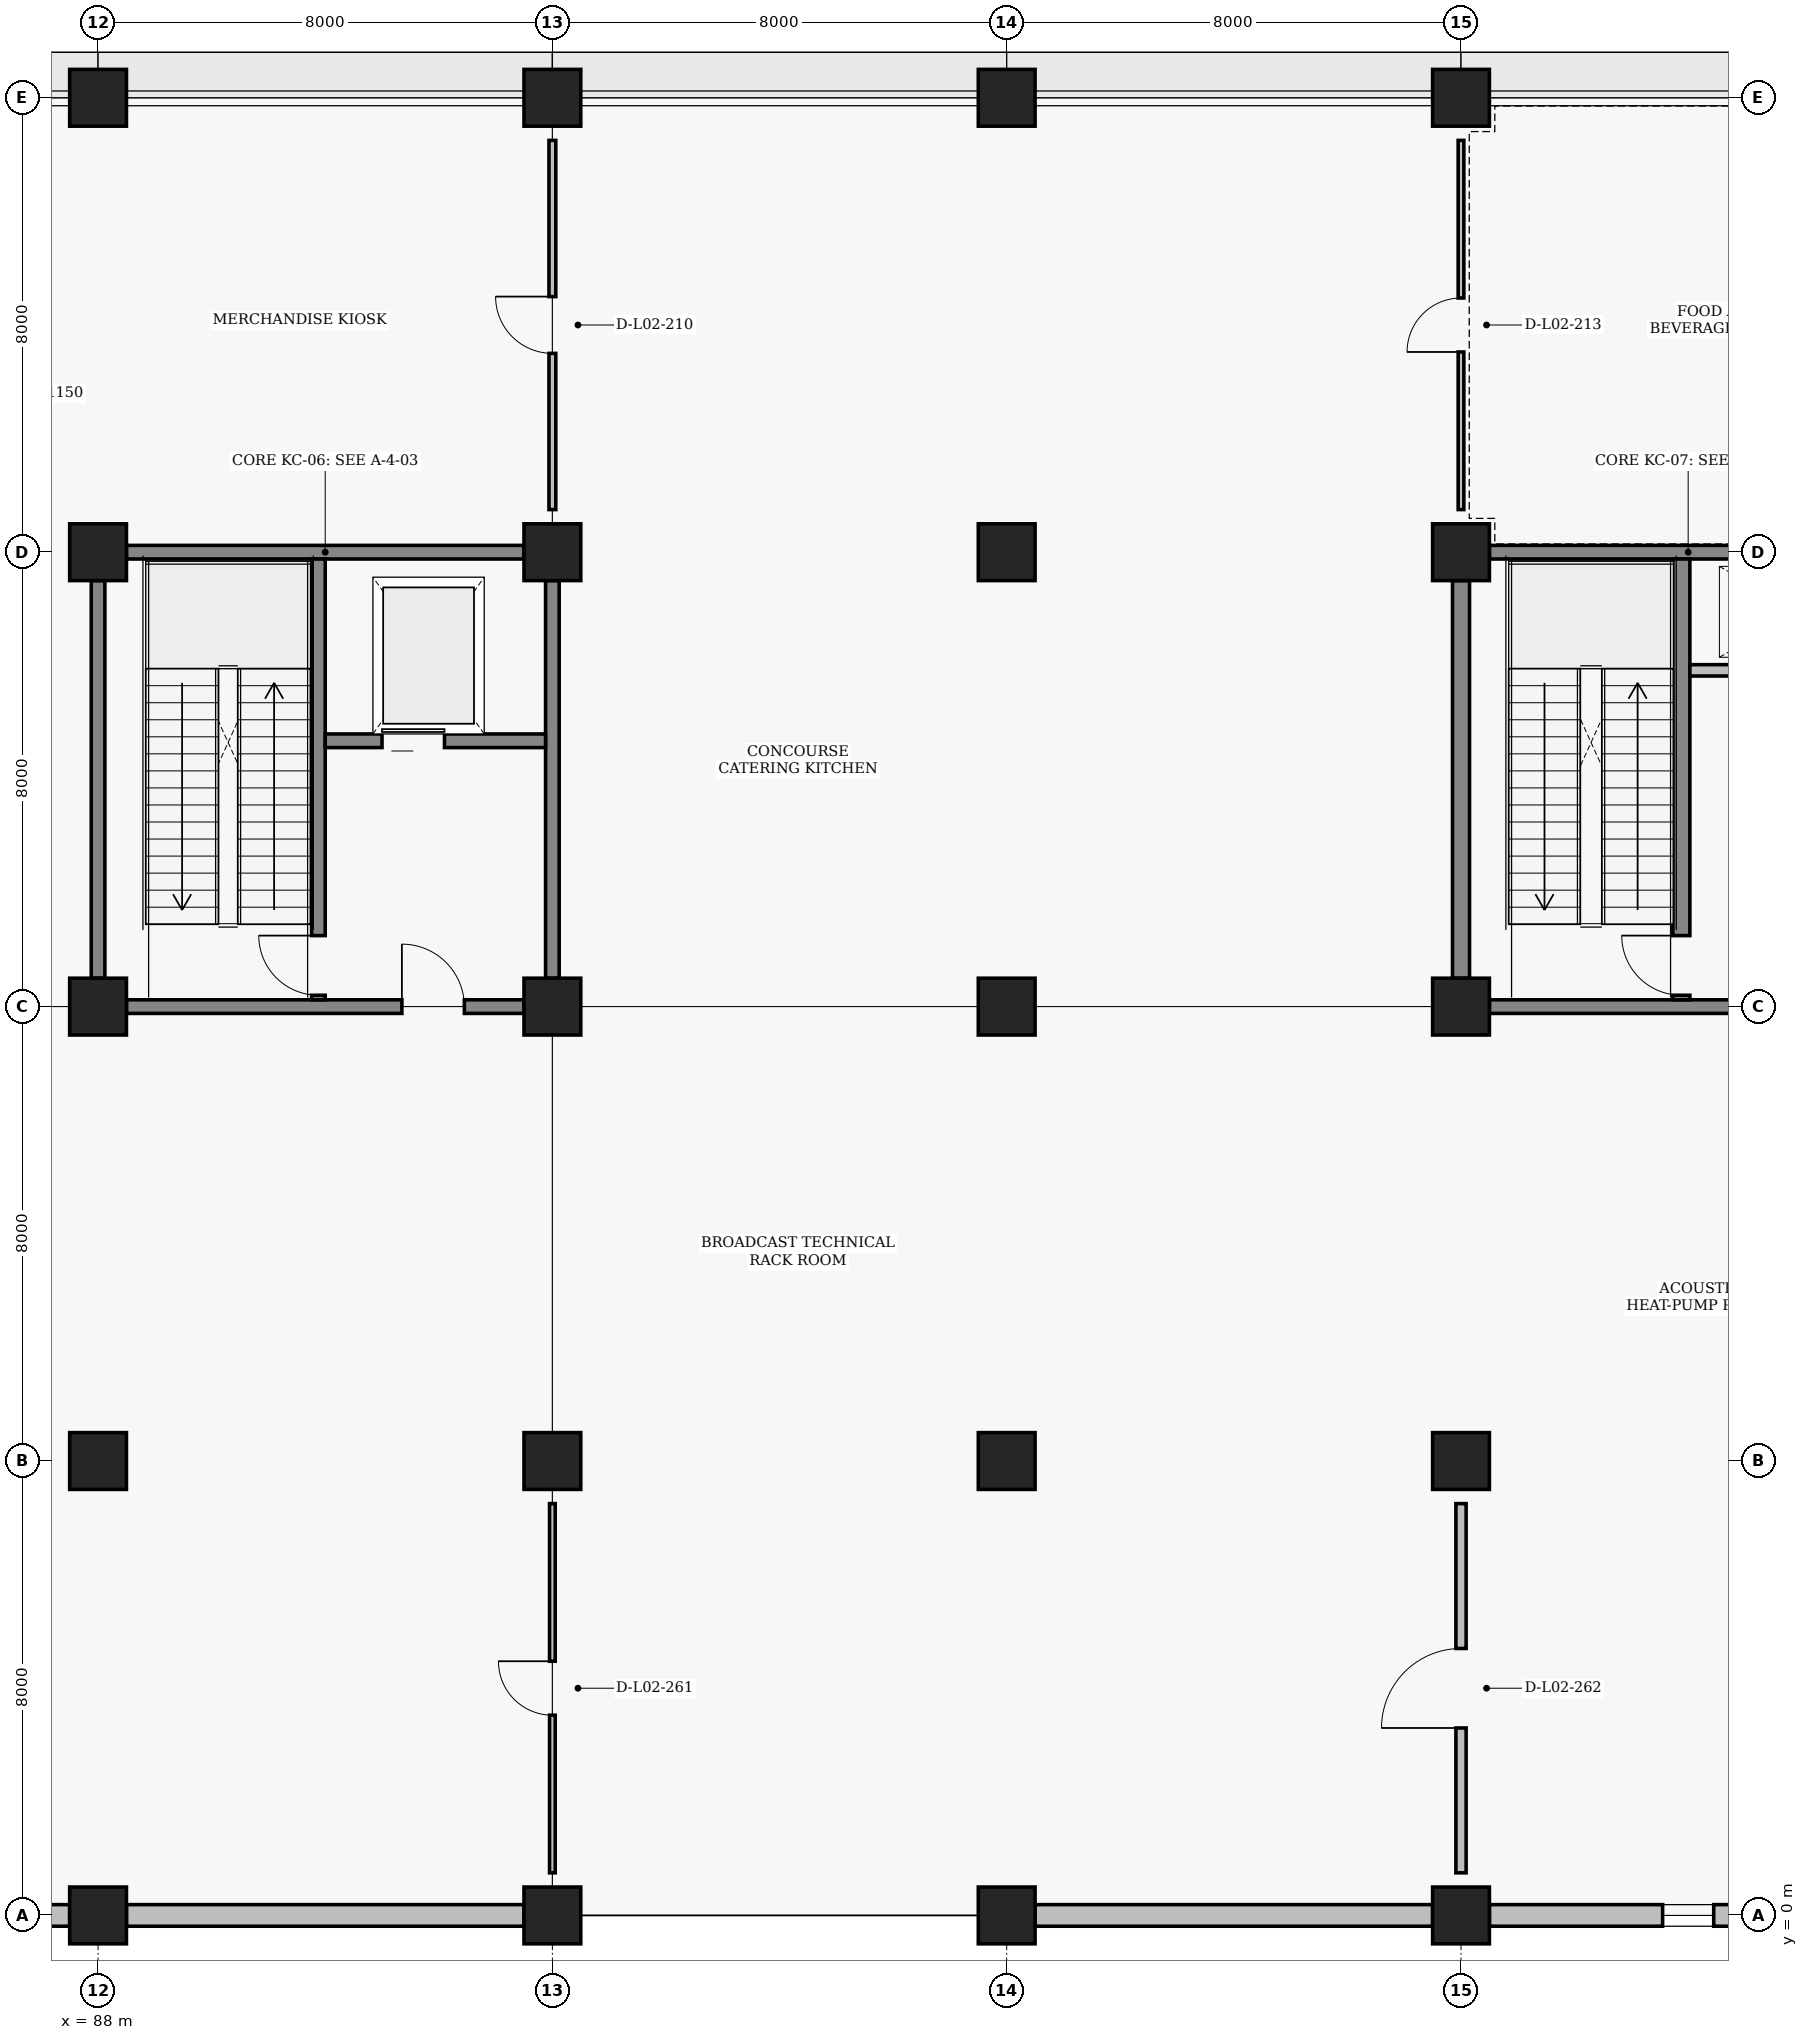
"""IFC4 building model, lengths in metres.
Left out: names, types, materials, properties, quantities, classifications, styles, units other than length and angle.
Written with IfcOpenShell. Run it as: python <this file> out.ifc"""

import sys

from ifc_helpers import new_model, si_unit, direction, frame, frame_2d, origin, origin_2d, place, context, subcontext, project, spatial, rectangle, extrude, element, fill, save


model = new_model("IFC4")
c1 = context("Model", 3, precision=1e-05, world=origin(), true_north=direction((0.0, 1.0)))
c2 = subcontext(c1, "Body", "Model", "MODEL_VIEW")
j1 = project(units=[si_unit("LENGTHUNIT", "METRE"), si_unit("PLANEANGLEUNIT", "RADIAN")], contexts=[c1])
p1 = place(None, origin())
s1 = spatial("IfcSite", under=j1, at=p1, CompositionType="ELEMENT")
p2 = place(p1, origin())
s2 = spatial("IfcBuilding", under=s1, at=p2, CompositionType="ELEMENT")
p3 = place(p2, frame((0.0, 0.0, 4.8)))
s3 = spatial("IfcBuildingStorey", under=s2, at=p3, CompositionType="ELEMENT", Elevation=4.8)
for number, where, z_axis, x_axis in (
    (1, (88.0, 0.0, 0.0), (0.0, 0.0, 1.0), (1.0, 0.0, 0.0)),
    (2, (88.0, 8.0, 0.0), (0.0, 0.0, 1.0), (1.0, 0.0, 0.0)),
    (3, (88.0, 16.0, 0.0), (0.0, 0.0, 1.0), (1.0, 0.0, 0.0)),
    (4, (88.0, 24.0, 0.0), (0.0, 0.0, 1.0), (1.0, 0.0, 0.0)),
    (5, (88.0, 32.0, 0.0), (0.0, 0.0, 1.0), (1.0, 0.0, 0.0)),
    (6, (96.0, 0.0, 0.0), (0.0, 0.0, 1.0), (1.0, 0.0, 0.0)),
    (7, (96.0, 8.0, 0.0), (0.0, 0.0, 1.0), (1.0, 0.0, 0.0)),
    (8, (96.0, 16.0, 0.0), (0.0, 0.0, 1.0), (1.0, 0.0, 0.0)),
    (9, (96.0, 24.0, 0.0), (0.0, 0.0, 1.0), (1.0, 0.0, 0.0)),
    (10, (96.0, 32.0, 0.0), (0.0, 0.0, 1.0), (1.0, 0.0, 0.0)),
    (11, (104.0, 0.0, 0.0), (0.0, 0.0, 1.0), (1.0, 0.0, 0.0)),
    (12, (104.0, 8.0, 0.0), (0.0, 0.0, 1.0), (1.0, 0.0, 0.0)),
    (13, (104.0, 16.0, 0.0), (0.0, 0.0, 1.0), (1.0, 0.0, 0.0)),
    (14, (104.0, 24.0, 0.0), (0.0, 0.0, 1.0), (1.0, 0.0, 0.0)),
    (15, (104.0, 32.0, 0.0), (0.0, 0.0, 1.0), (1.0, 0.0, 0.0)),
    (16, (112.0, 0.0, 0.0), (0.0, 0.0, 1.0), (1.0, 0.0, 0.0)),
    (17, (112.0, 8.0, 0.0), (0.0, 0.0, 1.0), (1.0, 0.0, 0.0)),
    (18, (112.0, 16.0, 0.0), (0.0, 0.0, 1.0), (1.0, 0.0, 0.0)),
    (19, (112.0, 24.0, 0.0), (0.0, 0.0, 1.0), (1.0, 0.0, 0.0)),
    (20, (112.0, 32.0, 0.0), (0.0, 0.0, 1.0), (1.0, 0.0, 0.0)),
):
    element("IfcColumn", number, at=place(p3, frame(where, z_axis=z_axis, x_axis=x_axis)), inside=s3, PredefinedType="COLUMN", context=c2, shape_type="SweptSolid", body=[
        extrude(rectangle(XDim=1.0, YDim=1.0, at=origin_2d()), origin(), (0.0, 0.0, 1.0), 4.8),
    ])
p4 = place(p3, frame((80.5, 0.0, 0.0), z_axis=(0.0, 0.0, 1.0), x_axis=(1.0, 0.0, 0.0)))
e21 = element("IfcWall", 21, at=p4, inside=s3, PredefinedType="SOLIDWALL", context=c2, shape_type="SweptSolid", body=[
    extrude(rectangle(XDim=7.0, YDim=0.38, at=frame_2d((3.5, 0.0))), origin(), (0.0, 0.0, 1.0), 3.95),
])
p5 = place(p4, frame((2.1, 0.0, 1.9)))
e22 = element("IfcOpeningElement", 22, at=p5, cuts=e21, PredefinedType="OPENING", context=c2, shape_type="SweptSolid", body=[
    extrude(rectangle(XDim=2.8, YDim=1.1, at=frame_2d((1.4, 0.55))), frame((0.0, 0.2, 0.0), z_axis=(0.0, -1.0, 0.0), x_axis=(1.0, 0.0, 0.0)), (0.0, 0.0, 1.0), 0.4),
])
for number, where, z_axis, x_axis in (
    (23, (88.5, 0.0, 0.0), (0.0, 0.0, 1.0), (1.0, 0.0, 0.0)),
    (24, (104.5, 0.0, 0.0), (0.0, 0.0, 1.0), (1.0, 0.0, 0.0)),
):
    element("IfcWall", number, at=place(p3, frame(where, z_axis=z_axis, x_axis=x_axis)), inside=s3, PredefinedType="SOLIDWALL", context=c2, shape_type="SweptSolid", body=[
        extrude(rectangle(XDim=7.0, YDim=0.38, at=frame_2d((3.5, 0.0))), origin(), (0.0, 0.0, 1.0), 3.95),
    ])
p6 = place(p3, frame((112.5, 0.0, 0.0), z_axis=(0.0, 0.0, 1.0), x_axis=(1.0, 0.0, 0.0)))
e25 = element("IfcWall", 25, at=p6, inside=s3, PredefinedType="SOLIDWALL", context=c2, shape_type="SweptSolid", body=[
    extrude(rectangle(XDim=7.0, YDim=0.38, at=frame_2d((3.5, 0.0))), origin(), (0.0, 0.0, 1.0), 3.95),
])
p7 = place(p6, frame((3.05, 0.0, 0.95)))
e26 = element("IfcOpeningElement", 26, at=p7, cuts=e25, PredefinedType="OPENING", context=c2, shape_type="SweptSolid", body=[
    extrude(rectangle(XDim=0.9, YDim=1.5, at=frame_2d((0.45, 0.75))), frame((0.0, 0.2, 0.0), z_axis=(0.0, -1.0, 0.0), x_axis=(1.0, 0.0, 0.0)), (0.0, 0.0, 1.0), 0.4),
])
p8 = place(p3, frame((88.5, 16.0, 0.0), z_axis=(0.0, 0.0, 1.0), x_axis=(1.0, 0.0, 0.0)))
e27 = element("IfcWall", 27, at=p8, inside=s3, PredefinedType="SHEAR", context=c2, shape_type="SweptSolid", body=[
    extrude(rectangle(XDim=7.0, YDim=0.24, at=frame_2d((3.5, 0.0))), origin(), (0.0, 0.0, 1.0), 3.61),
])
p9 = place(p8, frame((4.85, 0.0, 0.0)))
e28 = element("IfcOpeningElement", 28, at=p9, cuts=e27, PredefinedType="OPENING", context=c2, shape_type="SweptSolid", body=[
    extrude(rectangle(XDim=1.1, YDim=2.2, at=frame_2d((0.55, 1.1))), frame((0.0, 0.13, 0.0), z_axis=(0.0, -1.0, 0.0), x_axis=(1.0, 0.0, 0.0)), (0.0, 0.0, 1.0), 0.26),
])
p10 = place(p3, frame((88.5, 24.0, 0.0), z_axis=(0.0, 0.0, 1.0), x_axis=(1.0, 0.0, 0.0)))
e29 = element("IfcWall", 29, at=p10, inside=s3, PredefinedType="SHEAR", context=c2, shape_type="SweptSolid", body=[
    extrude(rectangle(XDim=7.0, YDim=0.24, at=frame_2d((3.5, 0.0))), origin(), (0.0, 0.0, 1.0), 3.91),
])
p11 = place(p3, frame((88.0, 16.5, 0.0), z_axis=(0.0, 0.0, 1.0), x_axis=(0.0, 1.0, 0.0)))
e30 = element("IfcWall", 30, at=p11, inside=s3, PredefinedType="SHEAR", context=c2, shape_type="SweptSolid", body=[
    extrude(rectangle(XDim=7.0, YDim=0.24, at=frame_2d((3.5, 0.0))), origin(), (0.0, 0.0, 1.0), 3.61),
])
p12 = place(p3, frame((96.0, 16.5, 0.0), z_axis=(0.0, 0.0, 1.0), x_axis=(0.0, 1.0, 0.0)))
e31 = element("IfcWall", 31, at=p12, inside=s3, PredefinedType="SHEAR", context=c2, shape_type="SweptSolid", body=[
    extrude(rectangle(XDim=7.0, YDim=0.24, at=frame_2d((3.5, 0.0))), origin(), (0.0, 0.0, 1.0), 3.91),
])
p13 = place(p3, frame((91.88, 16.12, 0.0), z_axis=(0.0, 0.0, 1.0), x_axis=(0.0, 1.0, 0.0)))
e32 = element("IfcWall", 32, at=p13, inside=s3, PredefinedType="SHEAR", context=c2, shape_type="SweptSolid", body=[
    extrude(rectangle(XDim=7.76, YDim=0.24, at=frame_2d((3.88, 0.0))), origin(), (0.0, 0.0, 1.0), 4.01),
])
p14 = place(p13, frame((0.08, 0.0, 0.0)))
e33 = element("IfcOpeningElement", 33, at=p14, cuts=e32, PredefinedType="OPENING", context=c2, shape_type="SweptSolid", body=[
    extrude(rectangle(XDim=1.05, YDim=2.15, at=frame_2d((0.525, 1.075))), frame((0.0, 0.13, 0.0), z_axis=(0.0, -1.0, 0.0), x_axis=(1.0, 0.0, 0.0)), (0.0, 0.0, 1.0), 0.26),
])
p15 = place(p3, frame((92.0, 20.68, 0.0), z_axis=(0.0, 0.0, 1.0), x_axis=(1.0, 0.0, 0.0)))
e34 = element("IfcWall", 34, at=p15, inside=s3, PredefinedType="SHEAR", context=c2, shape_type="SweptSolid", body=[
    extrude(rectangle(XDim=3.88, YDim=0.24, at=frame_2d((1.94, 0.0))), origin(), (0.0, 0.0, 1.0), 3.91),
])
p16 = place(p15, frame((1.0, 0.0, 0.0)))
e35 = element("IfcOpeningElement", 35, at=p16, cuts=e34, PredefinedType="OPENING", context=c2, shape_type="SweptSolid", body=[
    extrude(rectangle(XDim=1.1, YDim=2.15, at=frame_2d((0.55, 1.075))), frame((0.0, 0.13, 0.0), z_axis=(0.0, -1.0, 0.0), x_axis=(1.0, 0.0, 0.0)), (0.0, 0.0, 1.0), 0.26),
])
p17 = place(p3, frame((112.5, 16.0, 0.0), z_axis=(0.0, 0.0, 1.0), x_axis=(1.0, 0.0, 0.0)))
e36 = element("IfcWall", 36, at=p17, inside=s3, PredefinedType="SHEAR", context=c2, shape_type="SweptSolid", body=[
    extrude(rectangle(XDim=7.0, YDim=0.24, at=frame_2d((3.5, 0.0))), origin(), (0.0, 0.0, 1.0), 3.91),
])
p18 = place(p17, frame((4.85, 0.0, 0.0)))
e37 = element("IfcOpeningElement", 37, at=p18, cuts=e36, PredefinedType="OPENING", context=c2, shape_type="SweptSolid", body=[
    extrude(rectangle(XDim=1.1, YDim=2.2, at=frame_2d((0.55, 1.1))), frame((0.0, 0.13, 0.0), z_axis=(0.0, -1.0, 0.0), x_axis=(1.0, 0.0, 0.0)), (0.0, 0.0, 1.0), 0.26),
])
p19 = place(p3, frame((112.5, 24.0, 0.0), z_axis=(0.0, 0.0, 1.0), x_axis=(1.0, 0.0, 0.0)))
e38 = element("IfcWall", 38, at=p19, inside=s3, PredefinedType="SHEAR", context=c2, shape_type="SweptSolid", body=[
    extrude(rectangle(XDim=7.0, YDim=0.24, at=frame_2d((3.5, 0.0))), origin(), (0.0, 0.0, 1.0), 3.61),
])
p20 = place(p3, frame((112.0, 16.5, 0.0), z_axis=(0.0, 0.0, 1.0), x_axis=(0.0, 1.0, 0.0)))
e39 = element("IfcWall", 39, at=p20, inside=s3, PredefinedType="SHEAR", context=c2, shape_type="SweptSolid", body=[
    extrude(rectangle(XDim=7.0, YDim=0.3, at=frame_2d((3.5, 0.0))), origin(), (0.0, 0.0, 1.0), 3.91),
])
p21 = place(p3, frame((115.88, 16.12, 0.0), z_axis=(0.0, 0.0, 1.0), x_axis=(0.0, 1.0, 0.0)))
e40 = element("IfcWall", 40, at=p21, inside=s3, PredefinedType="SHEAR", context=c2, shape_type="SweptSolid", body=[
    extrude(rectangle(XDim=7.76, YDim=0.3, at=frame_2d((3.88, 0.0))), origin(), (0.0, 0.0, 1.0), 4.01),
])
p22 = place(p21, frame((0.08, 0.0, 0.0)))
e41 = element("IfcOpeningElement", 41, at=p22, cuts=e40, PredefinedType="OPENING", context=c2, shape_type="SweptSolid", body=[
    extrude(rectangle(XDim=1.05, YDim=2.15, at=frame_2d((0.525, 1.075))), frame((0.0, 0.16, 0.0), z_axis=(0.0, -1.0, 0.0), x_axis=(1.0, 0.0, 0.0)), (0.0, 0.0, 1.0), 0.32),
])
p23 = place(p3, frame((116.03, 21.92, 0.0), z_axis=(0.0, 0.0, 1.0), x_axis=(1.0, 0.0, 0.0)))
e42 = element("IfcWall", 42, at=p23, inside=s3, PredefinedType="PARTITIONING", context=c2, shape_type="SweptSolid", body=[
    extrude(rectangle(XDim=3.82, YDim=0.2, at=frame_2d((1.91, 0.0))), origin(), (0.0, 0.0, 1.0), 3.91),
])
p24 = place(p23, frame((1.25, 0.0, 0.0)))
e43 = element("IfcOpeningElement", 43, at=p24, cuts=e42, PredefinedType="OPENING", context=c2, shape_type="SweptSolid", body=[
    extrude(rectangle(XDim=0.85, YDim=2.05, at=frame_2d((0.425, 1.025))), frame((0.0, 0.11, 0.0), z_axis=(0.0, -1.0, 0.0), x_axis=(1.0, 0.0, 0.0)), (0.0, 0.0, 1.0), 0.22),
])
p25 = place(p3, frame((96.0, 24.75, 0.0), z_axis=(0.0, 0.0, 1.0), x_axis=(0.0, 1.0, 0.0)))
e44 = element("IfcWall", 44, at=p25, inside=s3, PredefinedType="PARTITIONING", context=c2, shape_type="SweptSolid", body=[
    extrude(rectangle(XDim=6.5, YDim=0.12, at=frame_2d((3.25, 0.0))), origin(), (0.0, 0.0, 1.0), 3.91),
])
p26 = place(p25, frame((2.75, 0.0, 0.0)))
e45 = element("IfcOpeningElement", 45, at=p26, cuts=e44, PredefinedType="OPENING", context=c2, shape_type="SweptSolid", body=[
    extrude(rectangle(XDim=1.0, YDim=2.1, at=frame_2d((0.5, 1.05))), frame((0.0, 0.07, 0.0), z_axis=(0.0, -1.0, 0.0), x_axis=(1.0, 0.0, 0.0)), (0.0, 0.0, 1.0), 0.14),
])
p27 = place(p3, frame((112.0, 24.75, 0.0), z_axis=(0.0, 0.0, 1.0), x_axis=(0.0, 1.0, 0.0)))
e46 = element("IfcWall", 46, at=p27, inside=s3, PredefinedType="PARTITIONING", context=c2, shape_type="SweptSolid", body=[
    extrude(rectangle(XDim=6.5, YDim=0.1, at=frame_2d((3.25, 0.0))), origin(), (0.0, 0.0, 1.0), 3.91),
])
p28 = place(p27, frame((2.775, 0.0, 0.0)))
e47 = element("IfcOpeningElement", 47, at=p28, cuts=e46, PredefinedType="OPENING", context=c2, shape_type="SweptSolid", body=[
    extrude(rectangle(XDim=0.95, YDim=2.1, at=frame_2d((0.475, 1.05))), frame((0.0, 0.06, 0.0), z_axis=(0.0, -1.0, 0.0), x_axis=(1.0, 0.0, 0.0)), (0.0, 0.0, 1.0), 0.12),
])
p29 = place(p3, frame((96.0, 0.75, 0.0), z_axis=(0.0, 0.0, 1.0), x_axis=(0.0, 1.0, 0.0)))
e48 = element("IfcWall", 48, at=p29, inside=s3, PredefinedType="PARTITIONING", context=c2, shape_type="SweptSolid", body=[
    extrude(rectangle(XDim=6.5, YDim=0.1, at=frame_2d((3.25, 0.0))), origin(), (0.0, 0.0, 1.0), 3.97),
])
p30 = place(p29, frame((2.775, 0.0, 0.0)))
e49 = element("IfcOpeningElement", 49, at=p30, cuts=e48, PredefinedType="OPENING", context=c2, shape_type="SweptSolid", body=[
    extrude(rectangle(XDim=0.95, YDim=2.1, at=frame_2d((0.475, 1.05))), frame((0.0, 0.06, 0.0), z_axis=(0.0, -1.0, 0.0), x_axis=(1.0, 0.0, 0.0)), (0.0, 0.0, 1.0), 0.12),
])
p31 = place(p3, frame((112.0, 0.75, 0.0), z_axis=(0.0, 0.0, 1.0), x_axis=(0.0, 1.0, 0.0)))
e50 = element("IfcWall", 50, at=p31, inside=s3, PredefinedType="PARTITIONING", context=c2, shape_type="SweptSolid", body=[
    extrude(rectangle(XDim=6.5, YDim=0.18, at=frame_2d((3.25, 0.0))), origin(), (0.0, 0.0, 1.0), 3.97),
])
p32 = place(p31, frame((2.55, 0.0, 0.0)))
e51 = element("IfcOpeningElement", 51, at=p32, cuts=e50, PredefinedType="OPENING", context=c2, shape_type="SweptSolid", body=[
    extrude(rectangle(XDim=1.4, YDim=2.2, at=frame_2d((0.7, 1.1))), frame((0.0, 0.1, 0.0), z_axis=(0.0, -1.0, 0.0), x_axis=(1.0, 0.0, 0.0)), (0.0, 0.0, 1.0), 0.2),
])
p33 = place(p7, origin())
e52 = element("IfcWindow", 52, at=p33, inside=s3, PartitioningType="SINGLE_PANEL", PredefinedType="WINDOW", context=c2, shape_type="SweptSolid", body=[
    extrude(rectangle(XDim=0.9, YDim=1.5, at=frame_2d((0.45, 0.75))), frame((0.0, 0.03, 0.0), z_axis=(0.0, -1.0, 0.0), x_axis=(1.0, 0.0, 0.0)), (0.0, 0.0, 1.0), 0.06),
])
fill(e26, e52)
p34 = place(p9, origin())
e53 = element("IfcDoor", 53, at=p34, inside=s3, OperationType="SINGLE_SWING_LEFT", PredefinedType="DOOR", context=c2, shape_type="SweptSolid", body=[
    extrude(rectangle(XDim=1.1, YDim=2.2, at=frame_2d((0.55, 1.1))), frame((0.0, 0.025, 0.0), z_axis=(0.0, -1.0, 0.0), x_axis=(1.0, 0.0, 0.0)), (0.0, 0.0, 1.0), 0.05),
])
fill(e28, e53)
p35 = place(p14, origin())
e54 = element("IfcDoor", 54, at=p35, inside=s3, OperationType="SINGLE_SWING_RIGHT", PredefinedType="DOOR", context=c2, shape_type="SweptSolid", body=[
    extrude(rectangle(XDim=1.05, YDim=2.15, at=frame_2d((0.525, 1.075))), frame((0.0, 0.025, 0.0), z_axis=(0.0, -1.0, 0.0), x_axis=(1.0, 0.0, 0.0)), (0.0, 0.0, 1.0), 0.05),
])
fill(e33, e54)
p36 = place(p16, origin())
e55 = element("IfcDoor", 55, at=p36, inside=s3, OperationType="SLIDING_TO_LEFT", PredefinedType="DOOR", context=c2, shape_type="SweptSolid", body=[
    extrude(rectangle(XDim=1.1, YDim=2.15, at=frame_2d((0.55, 1.075))), frame((0.0, 0.025, 0.0), z_axis=(0.0, -1.0, 0.0), x_axis=(1.0, 0.0, 0.0)), (0.0, 0.0, 1.0), 0.05),
])
fill(e35, e55)
p37 = place(p22, origin())
e56 = element("IfcDoor", 56, at=p37, inside=s3, OperationType="SINGLE_SWING_RIGHT", PredefinedType="DOOR", context=c2, shape_type="SweptSolid", body=[
    extrude(rectangle(XDim=1.05, YDim=2.15, at=frame_2d((0.525, 1.075))), frame((0.0, 0.025, 0.0), z_axis=(0.0, -1.0, 0.0), x_axis=(1.0, 0.0, 0.0)), (0.0, 0.0, 1.0), 0.05),
])
fill(e41, e56)
p38 = place(p26, origin())
e57 = element("IfcDoor", 57, at=p38, inside=s3, OperationType="SINGLE_SWING_RIGHT", PredefinedType="DOOR", context=c2, shape_type="SweptSolid", body=[
    extrude(rectangle(XDim=1.0, YDim=2.1, at=frame_2d((0.5, 1.05))), frame((0.0, 0.025, 0.0), z_axis=(0.0, -1.0, 0.0), x_axis=(1.0, 0.0, 0.0)), (0.0, 0.0, 1.0), 0.05),
])
fill(e45, e57)
p39 = place(p28, origin())
e58 = element("IfcDoor", 58, at=p39, inside=s3, OperationType="SINGLE_SWING_LEFT", PredefinedType="DOOR", context=c2, shape_type="SweptSolid", body=[
    extrude(rectangle(XDim=0.95, YDim=2.1, at=frame_2d((0.475, 1.05))), frame((0.0, 0.025, 0.0), z_axis=(0.0, -1.0, 0.0), x_axis=(1.0, 0.0, 0.0)), (0.0, 0.0, 1.0), 0.05),
])
fill(e47, e58)
p40 = place(p30, origin())
e59 = element("IfcDoor", 59, at=p40, inside=s3, OperationType="SINGLE_SWING_RIGHT", PredefinedType="DOOR", context=c2, shape_type="SweptSolid", body=[
    extrude(rectangle(XDim=0.95, YDim=2.1, at=frame_2d((0.475, 1.05))), frame((0.0, 0.025, 0.0), z_axis=(0.0, -1.0, 0.0), x_axis=(1.0, 0.0, 0.0)), (0.0, 0.0, 1.0), 0.05),
])
fill(e49, e59)
p41 = place(p32, origin())
e60 = element("IfcDoor", 60, at=p41, inside=s3, OperationType="SINGLE_SWING_LEFT", PredefinedType="DOOR", context=c2, shape_type="SweptSolid", body=[
    extrude(rectangle(XDim=1.4, YDim=2.2, at=frame_2d((0.7, 1.1))), frame((0.0, 0.025, 0.0), z_axis=(0.0, -1.0, 0.0), x_axis=(1.0, 0.0, 0.0)), (0.0, 0.0, 1.0), 0.05),
])
fill(e51, e60)
save(model, sys.argv[1])
